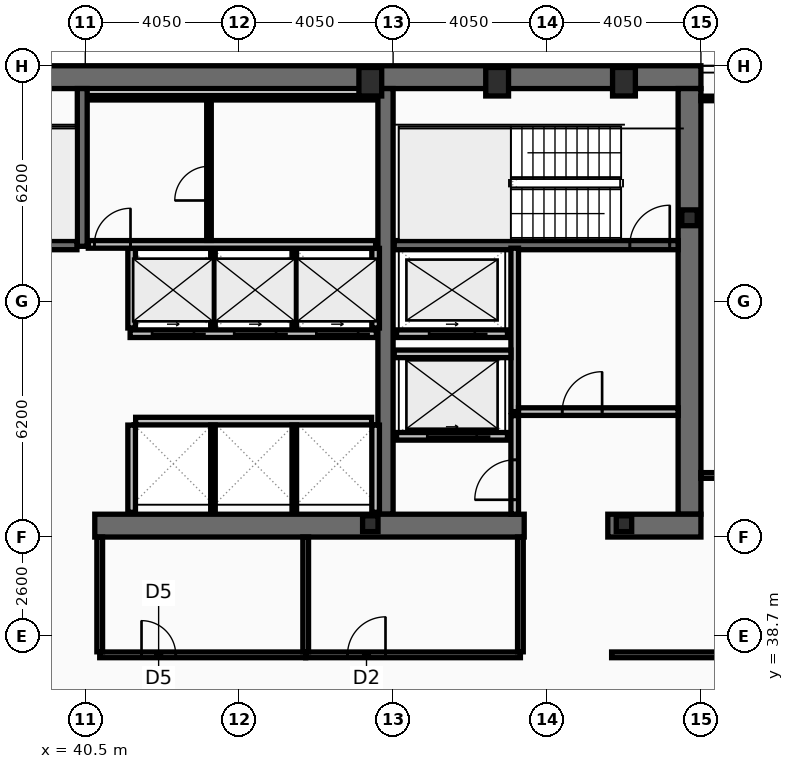
"""IFC4 building model, lengths in metres.
Left out: names, types, materials, properties, quantities, classifications, styles, units other than length and angle.
Written with IfcOpenShell. Run it as: python <this file> out.ifc"""

import sys

from ifc_helpers import new_model, si_unit, direction, frame, frame_2d, origin, origin_2d, place, context, subcontext, project, spatial, rectangle, hollow_rectangle, i_section, extrude, element, fill, save


model = new_model("IFC4")
c1 = context("Model", 3, precision=1e-05, world=origin(), true_north=direction((0.0, 1.0)))
c2 = subcontext(c1, "Body", "Model", "MODEL_VIEW")
j1 = project(units=[si_unit("LENGTHUNIT", "METRE"), si_unit("PLANEANGLEUNIT", "RADIAN")], contexts=[c1])
p1 = place(None, origin())
s1 = spatial("IfcSite", under=j1, at=p1, CompositionType="ELEMENT")
p2 = place(p1, origin())
s2 = spatial("IfcBuilding", under=s1, at=p2, CompositionType="ELEMENT")
p3 = place(p2, frame((0.0, 0.0, 239.0)))
s3 = spatial("IfcBuildingStorey", under=s2, at=p3, CompositionType="ELEMENT", Elevation=239.0)
p4 = place(p3, frame((16.2, 53.4, 0.0), z_axis=(0.0, 0.0, 1.0), x_axis=(1.0, 0.0, 0.0)))
e1 = element("IfcWall", 1, at=p4, inside=s3, PredefinedType="SHEAR", context=c2, shape_type="SweptSolid", body=[
    extrude(rectangle(XDim=40.5, YDim=0.6, at=frame_2d((20.25, 0.0))), origin(), (0.0, 0.0, 1.0), 3.44),
])
p5 = place(p3, frame((56.4, 53.1, 0.0), z_axis=(0.0, 0.0, 1.0), x_axis=(0.0, -1.0, 0.0)))
e2 = element("IfcWall", 2, at=p5, inside=s3, PredefinedType="SHEAR", context=c2, shape_type="SweptSolid", body=[
    extrude(rectangle(XDim=11.2, YDim=0.6, at=frame_2d((5.6, 0.0))), origin(), (0.0, 0.0, 1.0), 3.44),
])
p6 = place(p3, frame((48.4, 41.9, 0.0), z_axis=(0.0, 0.0, 1.0), x_axis=(0.0, 1.0, 0.0)))
e3 = element("IfcWall", 3, at=p6, inside=s3, PredefinedType="SHEAR", context=c2, shape_type="SweptSolid", body=[
    extrude(rectangle(XDim=11.2, YDim=0.4, at=frame_2d((5.6, 0.0))), origin(), (0.0, 0.0, 1.0), 3.44),
])
p7 = place(p3, frame((52.05, 41.6, 0.0), z_axis=(0.0, 0.0, 1.0), x_axis=(-1.0, 0.0, 0.0)))
e4 = element("IfcWall", 4, at=p7, inside=s3, PredefinedType="SHEAR", context=c2, shape_type="SweptSolid", body=[
    extrude(rectangle(XDim=11.3, YDim=0.6, at=frame_2d((5.65, 0.0))), origin(), (0.0, 0.0, 1.0), 3.44),
])
p8 = place(p3, frame((56.7, 41.6, 0.0), z_axis=(0.0, 0.0, 1.0), x_axis=(-1.0, 0.0, 0.0)))
e5 = element("IfcWall", 5, at=p8, inside=s3, PredefinedType="SHEAR", context=c2, shape_type="SweptSolid", body=[
    extrude(rectangle(XDim=2.45, YDim=0.6, at=frame_2d((1.225, 0.0))), origin(), (0.0, 0.0, 1.0), 3.44),
])
p9 = place(p3, frame((40.42, 48.95, 0.0), z_axis=(0.0, 0.0, 1.0), x_axis=(0.0, 1.0, 0.0)))
e6 = element("IfcWall", 6, at=p9, inside=s3, PredefinedType="SHEAR", context=c2, shape_type="SweptSolid", body=[
    extrude(rectangle(XDim=4.15, YDim=0.26, at=frame_2d((2.075, 0.0))), origin(), (0.0, 0.0, 1.0), 3.44),
])
p10 = place(p3, frame((48.63, 48.98, 0.0), z_axis=(0.0, 0.0, 1.0), x_axis=(1.0, 0.0, 0.0)))
e7 = element("IfcWall", 7, at=p10, inside=s3, PredefinedType="SHEAR", context=c2, shape_type="SweptSolid", body=[
    extrude(rectangle(XDim=7.47, YDim=0.24, at=frame_2d((3.735, 0.0))), origin(), (0.0, 0.0, 1.0), 3.44),
])
p11 = place(p10, frame((6.2, 0.0, 0.0)))
e8 = element("IfcOpeningElement", 8, at=p11, cuts=e7, PredefinedType="OPENING", context=c2, shape_type="SweptSolid", body=[
    extrude(rectangle(XDim=1.05, YDim=2.15, at=frame_2d((0.525, 1.075))), frame((0.0, 0.13, 0.0), z_axis=(0.0, -1.0, 0.0), x_axis=(1.0, 0.0, 0.0)), (0.0, 0.0, 1.0), 0.26),
])
p12 = place(p3, frame((32.72, 48.98, 0.0), z_axis=(0.0, 0.0, 1.0), x_axis=(1.0, 0.0, 0.0)))
e9 = element("IfcWall", 9, at=p12, inside=s3, PredefinedType="SHEAR", context=c2, shape_type="SweptSolid", body=[
    extrude(rectangle(XDim=7.56, YDim=0.24, at=frame_2d((3.78, 0.0))), origin(), (0.0, 0.0, 1.0), 3.44),
])
p13 = place(p12, frame((0.22, 0.0, 0.0)))
e10 = element("IfcOpeningElement", 10, at=p13, cuts=e9, PredefinedType="OPENING", context=c2, shape_type="SweptSolid", body=[
    extrude(rectangle(XDim=1.05, YDim=2.15, at=frame_2d((0.525, 1.075))), frame((0.0, 0.13, 0.0), z_axis=(0.0, -1.0, 0.0), x_axis=(1.0, 0.0, 0.0)), (0.0, 0.0, 1.0), 0.26),
])
for number, where, z_axis, x_axis in (
    (11, (48.0, 53.28, 0.0), (0.0, 0.0, 1.0), (1.0, 0.0, 0.0)),
    (12, (51.337, 53.28, 0.0), (0.0, 0.0, 1.0), (1.0, 0.0, 0.0)),
    (13, (54.675, 53.28, 0.0), (0.0, 0.0, 1.0), (1.0, 0.0, 0.0)),
):
    element("IfcColumn", number, at=place(p3, frame(where, z_axis=z_axis, x_axis=x_axis)), inside=s3, PredefinedType="COLUMN", context=c2, shape_type="SweptSolid", body=[
        extrude(hollow_rectangle(XDim=0.6, YDim=0.75, WallThickness=0.045, at=origin_2d()), origin(), (0.0, 0.0, 1.0), 3.6),
    ])
for number, where, z_axis, x_axis in (
    (14, (56.4, 49.7, 0.0), (0.0, 0.0, 1.0), (1.0, 0.0, 0.0)),
    (15, (48.0, 41.65, 0.0), (0.0, 0.0, 1.0), (1.0, 0.0, 0.0)),
    (16, (54.675, 41.65, 0.0), (0.0, 0.0, 1.0), (1.0, 0.0, 0.0)),
):
    element("IfcColumn", number, at=place(p3, frame(where, z_axis=z_axis, x_axis=x_axis)), inside=s3, PredefinedType="COLUMN", context=c2, shape_type="SweptSolid", body=[
        extrude(i_section(OverallWidth=0.406, OverallDepth=0.416, WebThickness=0.03, FlangeThickness=0.048, at=origin_2d()), origin(), (0.0, 0.0, 1.0), 3.6),
    ])
p14 = place(p3, frame((51.61, 43.95, 0.0), z_axis=(0.0, 0.0, 1.0), x_axis=(-1.0, 0.0, 0.0)))
e17 = element("IfcWall", 17, at=p14, inside=s3, PredefinedType="PARTITIONING", context=c2, shape_type="SweptSolid", body=[
    extrude(rectangle(XDim=2.92, YDim=0.2, at=frame_2d((1.46, 0.0))), origin(), (0.0, 0.0, 1.0), 3.44),
])
p15 = place(p14, frame((0.81, 0.0, 0.0)))
e18 = element("IfcOpeningElement", 18, at=p15, cuts=e17, PredefinedType="OPENING", context=c2, shape_type="SweptSolid", body=[
    extrude(rectangle(XDim=1.3, YDim=2.18, at=frame_2d((0.65, 1.09))), frame((0.0, 0.11, 0.0), z_axis=(0.0, -1.0, 0.0), x_axis=(1.0, 0.0, 0.0)), (0.0, 0.0, 1.0), 0.22),
])
p16 = place(p3, frame((51.61, 46.65, 0.0), z_axis=(0.0, 0.0, 1.0), x_axis=(-1.0, 0.0, 0.0)))
e19 = element("IfcWall", 19, at=p16, inside=s3, PredefinedType="PARTITIONING", context=c2, shape_type="SweptSolid", body=[
    extrude(rectangle(XDim=2.92, YDim=0.2, at=frame_2d((1.46, 0.0))), origin(), (0.0, 0.0, 1.0), 3.44),
])
p17 = place(p16, frame((0.86, 0.0, 0.0)))
e20 = element("IfcOpeningElement", 20, at=p17, cuts=e19, PredefinedType="OPENING", context=c2, shape_type="SweptSolid", body=[
    extrude(rectangle(XDim=1.2, YDim=2.18, at=frame_2d((0.6, 1.09))), frame((0.0, 0.11, 0.0), z_axis=(0.0, -1.0, 0.0), x_axis=(1.0, 0.0, 0.0)), (0.0, 0.0, 1.0), 0.22),
])
p18 = place(p3, frame((48.16, 46.65, 0.0), z_axis=(0.0, 0.0, 1.0), x_axis=(-1.0, 0.0, 0.0)))
e21 = element("IfcWall", 21, at=p18, inside=s3, PredefinedType="PARTITIONING", context=c2, shape_type="SweptSolid", body=[
    extrude(rectangle(XDim=6.48, YDim=0.2, at=frame_2d((3.24, 0.0))), origin(), (0.0, 0.0, 1.0), 3.44),
])
p19 = place(p18, frame((4.8, 0.0, 0.0)))
e22 = element("IfcOpeningElement", 22, at=p19, cuts=e21, PredefinedType="OPENING", context=c2, shape_type="SweptSolid", body=[
    extrude(rectangle(XDim=1.1, YDim=2.18, at=frame_2d((0.55, 1.09))), frame((0.0, 0.11, 0.0), z_axis=(0.0, -1.0, 0.0), x_axis=(1.0, 0.0, 0.0)), (0.0, 0.0, 1.0), 0.22),
])
p20 = place(p18, frame((2.64, 0.0, 0.0)))
e23 = element("IfcOpeningElement", 23, at=p20, cuts=e21, PredefinedType="OPENING", context=c2, shape_type="SweptSolid", body=[
    extrude(rectangle(XDim=1.1, YDim=2.18, at=frame_2d((0.55, 1.09))), frame((0.0, 0.11, 0.0), z_axis=(0.0, -1.0, 0.0), x_axis=(1.0, 0.0, 0.0)), (0.0, 0.0, 1.0), 0.22),
])
p21 = place(p18, frame((0.48, 0.0, 0.0)))
e24 = element("IfcOpeningElement", 24, at=p21, cuts=e21, PredefinedType="OPENING", context=c2, shape_type="SweptSolid", body=[
    extrude(rectangle(XDim=1.1, YDim=2.18, at=frame_2d((0.55, 1.09))), frame((0.0, 0.11, 0.0), z_axis=(0.0, -1.0, 0.0), x_axis=(1.0, 0.0, 0.0)), (0.0, 0.0, 1.0), 0.22),
])
p22 = place(p3, frame((51.8, 44.6, 0.0), z_axis=(0.0, 0.0, 1.0), x_axis=(0.0, 1.0, 0.0)))
e25 = element("IfcWall", 25, at=p22, inside=s3, PredefinedType="PARTITIONING", context=c2, shape_type="SweptSolid", body=[
    extrude(rectangle(XDim=4.3, YDim=0.2, at=frame_2d((2.15, 0.0))), origin(), (0.0, 0.0, 1.0), 3.44),
])
p23 = place(p3, frame((51.9, 44.6, 0.0), z_axis=(0.0, 0.0, 1.0), x_axis=(1.0, 0.0, 0.0)))
e26 = element("IfcWall", 26, at=p23, inside=s3, PredefinedType="PARTITIONING", context=c2, shape_type="SweptSolid", body=[
    extrude(rectangle(XDim=4.2, YDim=0.2, at=frame_2d((2.1, 0.0))), origin(), (0.0, 0.0, 1.0), 3.44),
])
p24 = place(p23, frame((1.15, 0.0, 0.0)))
e27 = element("IfcOpeningElement", 27, at=p24, cuts=e26, PredefinedType="OPENING", context=c2, shape_type="SweptSolid", body=[
    extrude(rectangle(XDim=1.05, YDim=2.15, at=frame_2d((0.525, 1.075))), frame((0.0, 0.11, 0.0), z_axis=(0.0, -1.0, 0.0), x_axis=(1.0, 0.0, 0.0)), (0.0, 0.0, 1.0), 0.22),
])
p25 = place(p3, frame((48.63, 46.12, 0.0), z_axis=(0.0, 0.0, 1.0), x_axis=(1.0, 0.0, 0.0)))
e28 = element("IfcWall", 28, at=p25, inside=s3, PredefinedType="PARTITIONING", context=c2, shape_type="SweptSolid", body=[
    extrude(rectangle(XDim=3.07, YDim=0.2, at=frame_2d((1.535, 0.0))), origin(), (0.0, 0.0, 1.0), 3.44),
])
p26 = place(p3, frame((51.8, 41.9, 0.0), z_axis=(0.0, 0.0, 1.0), x_axis=(0.0, 1.0, 0.0)))
e29 = element("IfcWall", 29, at=p26, inside=s3, PredefinedType="PARTITIONING", context=c2, shape_type="SweptSolid", body=[
    extrude(rectangle(XDim=2.595, YDim=0.2, at=frame_2d((1.298, 0.0))), origin(), (0.0, 0.0, 1.0), 3.44),
])
p27 = place(p26, frame((0.38, 0.0, 0.0)))
e30 = element("IfcOpeningElement", 30, at=p27, cuts=e29, PredefinedType="OPENING", context=c2, shape_type="SweptSolid", body=[
    extrude(rectangle(XDim=1.05, YDim=2.15, at=frame_2d((0.525, 1.075))), frame((0.0, 0.11, 0.0), z_axis=(0.0, -1.0, 0.0), x_axis=(1.0, 0.0, 0.0)), (0.0, 0.0, 1.0), 0.22),
])
for number, where, z_axis, x_axis in (
    (31, (41.72, 46.8, 0.0), (0.0, 0.0, 1.0), (0.0, 1.0, 0.0)),
    (32, (48.14, 46.8, 0.0), (0.0, 0.0, 1.0), (0.0, 1.0, 0.0)),
):
    element("IfcWall", number, at=place(p3, frame(where, z_axis=z_axis, x_axis=x_axis)), inside=s3, PredefinedType="PARTITIONING", context=c2, shape_type="SweptSolid", body=[
        extrude(rectangle(XDim=2.095, YDim=0.2, at=frame_2d((1.047, 0.0))), origin(), (0.0, 0.0, 1.0), 3.44),
    ])
for number, where, z_axis, x_axis in (
    (33, (43.86, 46.8, 0.0), (0.0, 0.0, 1.0), (0.0, 1.0, 0.0)),
    (34, (46.0, 46.8, 0.0), (0.0, 0.0, 1.0), (0.0, 1.0, 0.0)),
):
    element("IfcWall", number, at=place(p3, frame(where, z_axis=z_axis, x_axis=x_axis)), inside=s3, PredefinedType="PARTITIONING", context=c2, shape_type="SweptSolid", body=[
        extrude(rectangle(XDim=2.095, YDim=0.12, at=frame_2d((1.047, 0.0))), origin(), (0.0, 0.0, 1.0), 3.44),
    ])
p28 = place(p3, frame((41.825, 44.35, 0.0), z_axis=(0.0, 0.0, 1.0), x_axis=(1.0, 0.0, 0.0)))
e35 = element("IfcWall", 35, at=p28, inside=s3, PredefinedType="PARTITIONING", context=c2, shape_type="SweptSolid", body=[
    extrude(rectangle(XDim=6.21, YDim=0.2, at=frame_2d((3.105, 0.0))), origin(), (0.0, 0.0, 1.0), 3.44),
])
for number, where, z_axis, x_axis in (
    (36, (41.72, 41.95, 0.0), (0.0, 0.0, 1.0), (0.0, 1.0, 0.0)),
    (37, (48.14, 41.95, 0.0), (0.0, 0.0, 1.0), (0.0, 1.0, 0.0)),
):
    element("IfcWall", number, at=place(p3, frame(where, z_axis=z_axis, x_axis=x_axis)), inside=s3, PredefinedType="PARTITIONING", context=c2, shape_type="SweptSolid", body=[
        extrude(rectangle(XDim=2.295, YDim=0.2, at=frame_2d((1.147, 0.0))), origin(), (0.0, 0.0, 1.0), 3.44),
    ])
for number, where, z_axis, x_axis in (
    (38, (43.86, 41.95, 0.0), (0.0, 0.0, 1.0), (0.0, 1.0, 0.0)),
    (39, (46.0, 41.95, 0.0), (0.0, 0.0, 1.0), (0.0, 1.0, 0.0)),
):
    element("IfcWall", number, at=place(p3, frame(where, z_axis=z_axis, x_axis=x_axis)), inside=s3, PredefinedType="PARTITIONING", context=c2, shape_type="SweptSolid", body=[
        extrude(rectangle(XDim=2.295, YDim=0.12, at=frame_2d((1.147, 0.0))), origin(), (0.0, 0.0, 1.0), 3.44),
    ])
p29 = place(p3, frame((40.58, 52.86, 0.0), z_axis=(0.0, 0.0, 1.0), x_axis=(1.0, 0.0, 0.0)))
e40 = element("IfcWall", 40, at=p29, inside=s3, PredefinedType="PARTITIONING", context=c2, shape_type="SweptSolid", body=[
    extrude(rectangle(XDim=7.56, YDim=0.12, at=frame_2d((3.78, 0.0))), origin(), (0.0, 0.0, 1.0), 3.44),
])
p30 = place(p3, frame((40.58, 49.0, 0.0), z_axis=(0.0, 0.0, 1.0), x_axis=(1.0, 0.0, 0.0)))
e41 = element("IfcWall", 41, at=p30, inside=s3, PredefinedType="PARTITIONING", context=c2, shape_type="SweptSolid", body=[
    extrude(rectangle(XDim=7.56, YDim=0.2, at=frame_2d((3.78, 0.0))), origin(), (0.0, 0.0, 1.0), 3.44),
])
p31 = place(p30, frame((0.16, 0.0, 0.0)))
e42 = element("IfcOpeningElement", 42, at=p31, cuts=e41, PredefinedType="OPENING", context=c2, shape_type="SweptSolid", body=[
    extrude(rectangle(XDim=0.95, YDim=2.1, at=frame_2d((0.475, 1.05))), frame((0.0, 0.11, 0.0), z_axis=(0.0, -1.0, 0.0), x_axis=(1.0, 0.0, 0.0)), (0.0, 0.0, 1.0), 0.22),
])
p32 = place(p3, frame((43.755, 49.105, 0.0), z_axis=(0.0, 0.0, 1.0), x_axis=(0.0, 1.0, 0.0)))
e43 = element("IfcWall", 43, at=p32, inside=s3, PredefinedType="PARTITIONING", context=c2, shape_type="SweptSolid", body=[
    extrude(rectangle(XDim=3.69, YDim=0.12, at=frame_2d((1.845, 0.0))), origin(), (0.0, 0.0, 1.0), 3.44),
])
p33 = place(p32, frame((1.05, 0.0, 0.0)))
e44 = element("IfcOpeningElement", 44, at=p33, cuts=e43, PredefinedType="OPENING", context=c2, shape_type="SweptSolid", body=[
    extrude(rectangle(XDim=0.9, YDim=2.05, at=frame_2d((0.45, 1.025))), frame((0.0, 0.07, 0.0), z_axis=(0.0, -1.0, 0.0), x_axis=(1.0, 0.0, 0.0)), (0.0, 0.0, 1.0), 0.14),
])
p34 = place(p3, frame((40.88, 38.2, 0.0), z_axis=(0.0, 0.0, 1.0), x_axis=(1.0, 0.0, 0.0)))
e45 = element("IfcWall", 45, at=p34, inside=s3, PredefinedType="PARTITIONING", context=c2, shape_type="SweptSolid", body=[
    extrude(rectangle(XDim=5.42, YDim=0.15, at=frame_2d((2.71, 0.0))), origin(), (0.0, 0.0, 1.0), 2.78),
])
p35 = place(p34, frame((1.1, 0.0, 0.0)))
e46 = element("IfcOpeningElement", 46, at=p35, cuts=e45, PredefinedType="OPENING", context=c2, shape_type="SweptSolid", body=[
    extrude(rectangle(XDim=0.9, YDim=2.05, at=frame_2d((0.45, 1.025))), frame((0.0, 0.085, 0.0), z_axis=(0.0, -1.0, 0.0), x_axis=(1.0, 0.0, 0.0)), (0.0, 0.0, 1.0), 0.17),
])
p36 = place(p3, frame((46.3, 38.2, 0.0), z_axis=(0.0, 0.0, 1.0), x_axis=(1.0, 0.0, 0.0)))
e47 = element("IfcWall", 47, at=p36, inside=s3, PredefinedType="PARTITIONING", context=c2, shape_type="SweptSolid", body=[
    extrude(rectangle(XDim=5.65, YDim=0.15, at=frame_2d((2.825, 0.0))), origin(), (0.0, 0.0, 1.0), 2.78),
])
p37 = place(p36, frame((1.1, 0.0, 0.0)))
e48 = element("IfcOpeningElement", 48, at=p37, cuts=e47, PredefinedType="OPENING", context=c2, shape_type="SweptSolid", body=[
    extrude(rectangle(XDim=1.0, YDim=2.05, at=frame_2d((0.5, 1.025))), frame((0.0, 0.085, 0.0), z_axis=(0.0, -1.0, 0.0), x_axis=(1.0, 0.0, 0.0)), (0.0, 0.0, 1.0), 0.17),
])
for number, where, z_axis, x_axis in (
    (49, (40.88, 38.28, 0.0), (0.0, 0.0, 1.0), (0.0, 1.0, 0.0)),
    (50, (46.3, 38.28, 0.0), (0.0, 0.0, 1.0), (0.0, 1.0, 0.0)),
    (51, (51.95, 38.28, 0.0), (0.0, 0.0, 1.0), (0.0, 1.0, 0.0)),
):
    element("IfcWall", number, at=place(p3, frame(where, z_axis=z_axis, x_axis=x_axis)), inside=s3, PredefinedType="PARTITIONING", context=c2, shape_type="SweptSolid", body=[
        extrude(rectangle(XDim=3.02, YDim=0.15, at=frame_2d((1.51, 0.0))), origin(), (0.0, 0.0, 1.0), 3.44),
    ])
p38 = place(p3, frame((54.35, 38.2, 0.0), z_axis=(0.0, 0.0, 1.0), x_axis=(1.0, 0.0, 0.0)))
e52 = element("IfcWall", 52, at=p38, inside=s3, PredefinedType="PARTITIONING", context=c2, shape_type="SweptSolid", body=[
    extrude(rectangle(XDim=8.52, YDim=0.15, at=frame_2d((4.26, 0.0))), origin(), (0.0, 0.0, 1.0), 2.78),
])
p39 = place(p38, frame((3.25, 0.0, 0.0)))
e53 = element("IfcOpeningElement", 53, at=p39, cuts=e52, PredefinedType="OPENING", context=c2, shape_type="SweptSolid", body=[
    extrude(rectangle(XDim=0.95, YDim=2.05, at=frame_2d((0.475, 1.025))), frame((0.0, 0.085, 0.0), z_axis=(0.0, -1.0, 0.0), x_axis=(1.0, 0.0, 0.0)), (0.0, 0.0, 1.0), 0.17),
])
p40 = place(p3, frame((56.7, 42.92, 0.0), z_axis=(0.0, 0.0, 1.0), x_axis=(1.0, 0.0, 0.0)))
e54 = element("IfcWall", 54, at=p40, inside=s3, PredefinedType="PARTITIONING", context=c2, shape_type="SweptSolid", body=[
    extrude(rectangle(XDim=6.105, YDim=0.15, at=frame_2d((3.052, 0.0))), origin(), (0.0, 0.0, 1.0), 2.78),
])
p41 = place(p40, frame((0.9, 0.0, 0.0)))
e55 = element("IfcOpeningElement", 55, at=p41, cuts=e54, PredefinedType="OPENING", context=c2, shape_type="SweptSolid", body=[
    extrude(rectangle(XDim=0.9, YDim=2.05, at=frame_2d((0.45, 1.025))), frame((0.0, 0.085, 0.0), z_axis=(0.0, -1.0, 0.0), x_axis=(1.0, 0.0, 0.0)), (0.0, 0.0, 1.0), 0.17),
])
p42 = place(p3, frame((56.7, 52.84, 0.0), z_axis=(0.0, 0.0, 1.0), x_axis=(1.0, 0.0, 0.0)))
e56 = element("IfcWall", 56, at=p42, inside=s3, PredefinedType="PARTITIONING", context=c2, shape_type="SweptSolid", body=[
    extrude(rectangle(XDim=6.105, YDim=0.12, at=frame_2d((3.052, 0.0))), origin(), (0.0, 0.0, 1.0), 3.44),
])
p43 = place(p11, origin())
e57 = element("IfcDoor", 57, at=p43, inside=s3, OperationType="SINGLE_SWING_RIGHT", PredefinedType="DOOR", context=c2, shape_type="SweptSolid", body=[
    extrude(rectangle(XDim=1.05, YDim=2.15, at=frame_2d((0.525, 1.075))), frame((0.0, 0.025, 0.0), z_axis=(0.0, -1.0, 0.0), x_axis=(1.0, 0.0, 0.0)), (0.0, 0.0, 1.0), 0.05),
])
fill(e8, e57)
p44 = place(p15, origin())
e58 = element("IfcDoor", 58, at=p44, inside=s3, OperationType="SLIDING_TO_LEFT", PredefinedType="DOOR", context=c2, shape_type="SweptSolid", body=[
    extrude(rectangle(XDim=1.3, YDim=2.18, at=frame_2d((0.65, 1.09))), frame((0.0, 0.025, 0.0), z_axis=(0.0, -1.0, 0.0), x_axis=(1.0, 0.0, 0.0)), (0.0, 0.0, 1.0), 0.05),
])
fill(e18, e58)
p45 = place(p17, origin())
e59 = element("IfcDoor", 59, at=p45, inside=s3, OperationType="SLIDING_TO_LEFT", PredefinedType="DOOR", context=c2, shape_type="SweptSolid", body=[
    extrude(rectangle(XDim=1.2, YDim=2.18, at=frame_2d((0.6, 1.09))), frame((0.0, 0.025, 0.0), z_axis=(0.0, -1.0, 0.0), x_axis=(1.0, 0.0, 0.0)), (0.0, 0.0, 1.0), 0.05),
])
fill(e20, e59)
p46 = place(p19, origin())
e60 = element("IfcDoor", 60, at=p46, inside=s3, OperationType="SLIDING_TO_LEFT", PredefinedType="DOOR", context=c2, shape_type="SweptSolid", body=[
    extrude(rectangle(XDim=1.1, YDim=2.18, at=frame_2d((0.55, 1.09))), frame((0.0, 0.025, 0.0), z_axis=(0.0, -1.0, 0.0), x_axis=(1.0, 0.0, 0.0)), (0.0, 0.0, 1.0), 0.05),
])
fill(e22, e60)
p47 = place(p20, origin())
e61 = element("IfcDoor", 61, at=p47, inside=s3, OperationType="SLIDING_TO_LEFT", PredefinedType="DOOR", context=c2, shape_type="SweptSolid", body=[
    extrude(rectangle(XDim=1.1, YDim=2.18, at=frame_2d((0.55, 1.09))), frame((0.0, 0.025, 0.0), z_axis=(0.0, -1.0, 0.0), x_axis=(1.0, 0.0, 0.0)), (0.0, 0.0, 1.0), 0.05),
])
fill(e23, e61)
p48 = place(p21, origin())
e62 = element("IfcDoor", 62, at=p48, inside=s3, OperationType="SLIDING_TO_LEFT", PredefinedType="DOOR", context=c2, shape_type="SweptSolid", body=[
    extrude(rectangle(XDim=1.1, YDim=2.18, at=frame_2d((0.55, 1.09))), frame((0.0, 0.025, 0.0), z_axis=(0.0, -1.0, 0.0), x_axis=(1.0, 0.0, 0.0)), (0.0, 0.0, 1.0), 0.05),
])
fill(e24, e62)
p49 = place(p24, origin())
e63 = element("IfcDoor", 63, at=p49, inside=s3, OperationType="SINGLE_SWING_RIGHT", PredefinedType="DOOR", context=c2, shape_type="SweptSolid", body=[
    extrude(rectangle(XDim=1.05, YDim=2.15, at=frame_2d((0.525, 1.075))), frame((0.0, 0.025, 0.0), z_axis=(0.0, -1.0, 0.0), x_axis=(1.0, 0.0, 0.0)), (0.0, 0.0, 1.0), 0.05),
])
fill(e27, e63)
p50 = place(p27, origin())
e64 = element("IfcDoor", 64, at=p50, inside=s3, OperationType="SINGLE_SWING_LEFT", PredefinedType="DOOR", context=c2, shape_type="SweptSolid", body=[
    extrude(rectangle(XDim=1.05, YDim=2.15, at=frame_2d((0.525, 1.075))), frame((0.0, 0.025, 0.0), z_axis=(0.0, -1.0, 0.0), x_axis=(1.0, 0.0, 0.0)), (0.0, 0.0, 1.0), 0.05),
])
fill(e30, e64)
p51 = place(p31, origin())
e65 = element("IfcDoor", 65, at=p51, inside=s3, OperationType="SINGLE_SWING_RIGHT", PredefinedType="DOOR", context=c2, shape_type="SweptSolid", body=[
    extrude(rectangle(XDim=0.95, YDim=2.1, at=frame_2d((0.475, 1.05))), frame((0.0, 0.025, 0.0), z_axis=(0.0, -1.0, 0.0), x_axis=(1.0, 0.0, 0.0)), (0.0, 0.0, 1.0), 0.05),
])
fill(e42, e65)
p52 = place(p33, origin())
e66 = element("IfcDoor", 66, at=p52, inside=s3, OperationType="SINGLE_SWING_LEFT", PredefinedType="DOOR", context=c2, shape_type="SweptSolid", body=[
    extrude(rectangle(XDim=0.9, YDim=2.05, at=frame_2d((0.45, 1.025))), frame((0.0, 0.025, 0.0), z_axis=(0.0, -1.0, 0.0), x_axis=(1.0, 0.0, 0.0)), (0.0, 0.0, 1.0), 0.05),
])
fill(e44, e66)
p53 = place(p35, origin())
e67 = element("IfcDoor", 67, at=p53, inside=s3, OperationType="SINGLE_SWING_LEFT", PredefinedType="DOOR", context=c2, shape_type="SweptSolid", body=[
    extrude(rectangle(XDim=0.9, YDim=2.05, at=frame_2d((0.45, 1.025))), frame((0.0, 0.025, 0.0), z_axis=(0.0, -1.0, 0.0), x_axis=(1.0, 0.0, 0.0)), (0.0, 0.0, 1.0), 0.05),
])
fill(e46, e67)
p54 = place(p37, origin())
e68 = element("IfcDoor", 68, at=p54, inside=s3, OperationType="SINGLE_SWING_RIGHT", PredefinedType="DOOR", context=c2, shape_type="SweptSolid", body=[
    extrude(rectangle(XDim=1.0, YDim=2.05, at=frame_2d((0.5, 1.025))), frame((0.0, 0.025, 0.0), z_axis=(0.0, -1.0, 0.0), x_axis=(1.0, 0.0, 0.0)), (0.0, 0.0, 1.0), 0.05),
])
fill(e48, e68)
save(model, sys.argv[1])
